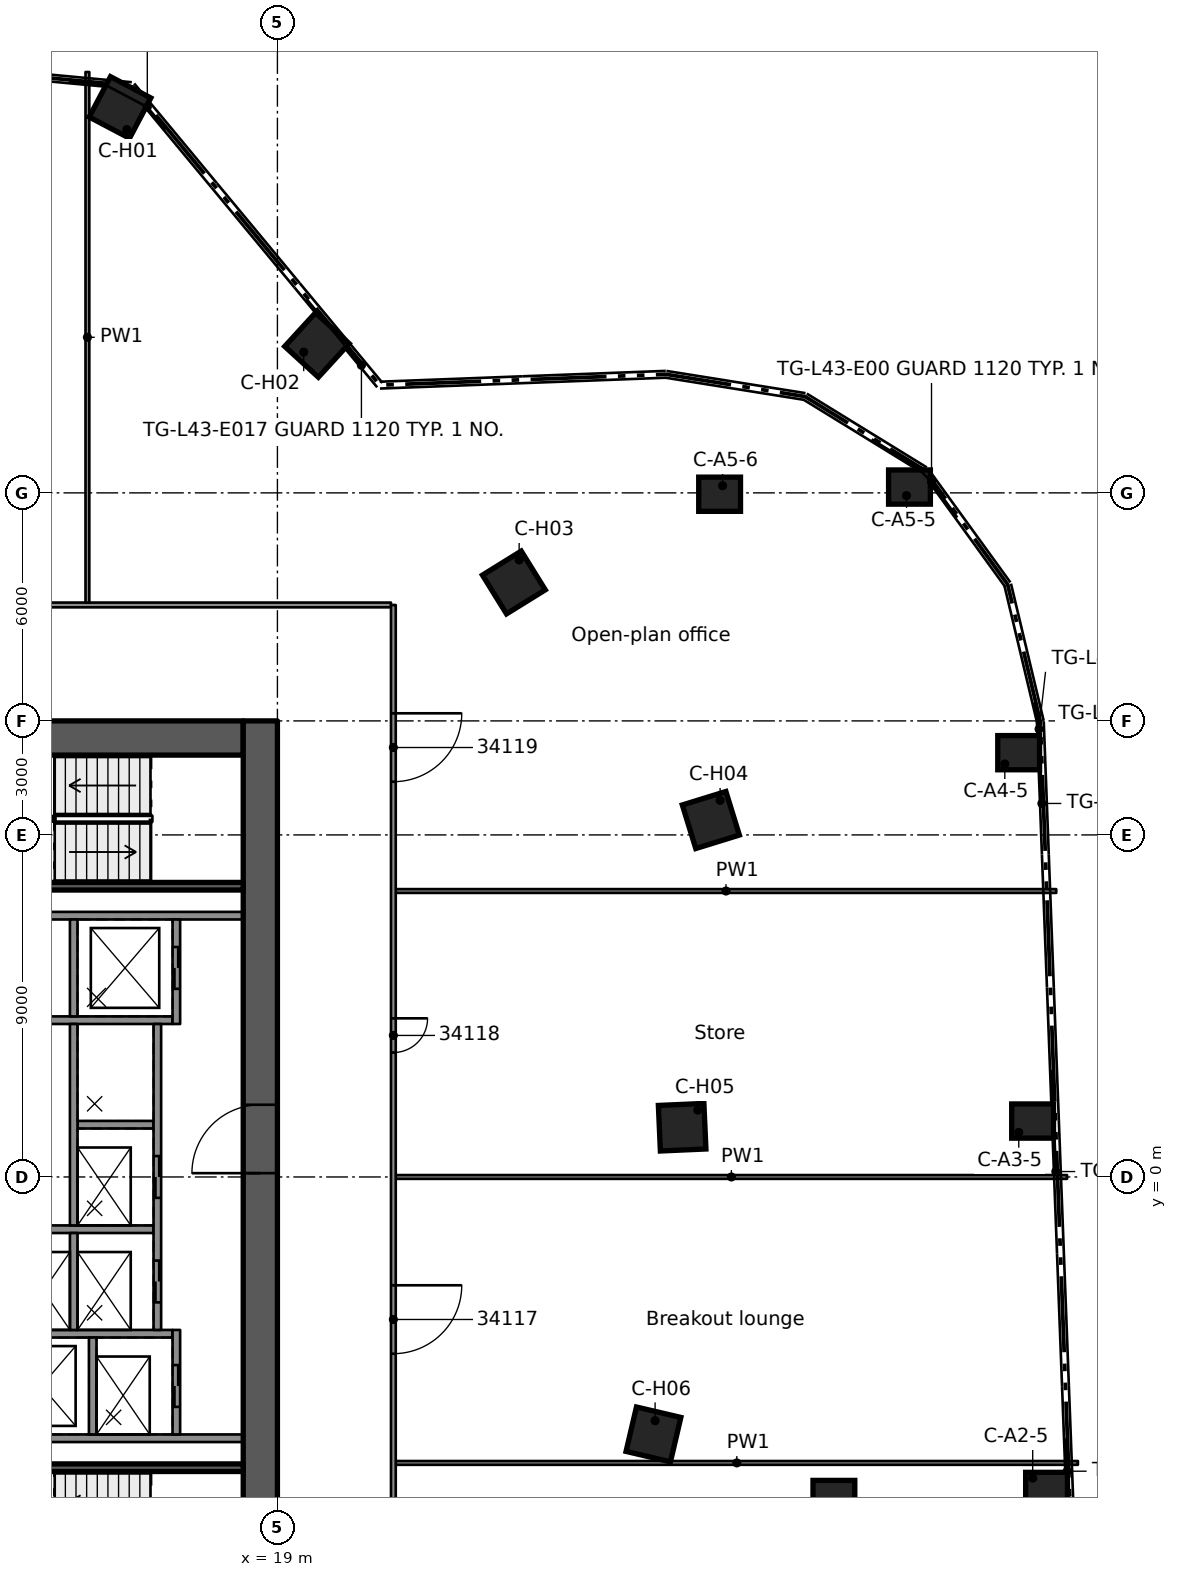
"""IFC4 building model, lengths in metres.
Left out: names, types, materials, properties, quantities, classifications, styles, units other than length and angle.
Written with IfcOpenShell. Run it as: python <this file> out.ifc"""

import sys

from ifc_helpers import new_model, si_unit, direction, frame, frame_2d, origin, origin_2d, place, context, subcontext, project, spatial, rectangle, extrude, element, fill, save


model = new_model("IFC4")
c1 = context("Model", 3, precision=1e-05, world=origin(), true_north=direction((0.0, 1.0)))
c2 = subcontext(c1, "Body", "Model", "MODEL_VIEW")
j1 = project(units=[si_unit("LENGTHUNIT", "METRE"), si_unit("PLANEANGLEUNIT", "RADIAN")], contexts=[c1])
p1 = place(None, origin())
s1 = spatial("IfcSite", under=j1, at=p1, CompositionType="ELEMENT")
p2 = place(p1, origin())
s2 = spatial("IfcBuilding", under=s1, at=p2, CompositionType="ELEMENT")
p3 = place(p2, frame((0.0, 0.0, 167.1)))
s3 = spatial("IfcBuildingStorey", under=s2, at=p3, CompositionType="ELEMENT", Elevation=167.1)
p4 = place(p3, frame((8.9, 11.55, 0.0), z_axis=(0.0, 0.0, 1.0), x_axis=(1.0, 0.0, 0.0)))
e1 = element("IfcWall", 1, at=p4, inside=s3, PredefinedType="SHEAR", context=c2, shape_type="SweptSolid", body=[
    extrude(rectangle(XDim=9.2, YDim=0.9, at=frame_2d((4.6, 0.0))), origin(), (0.0, 0.0, 1.0), 3.5),
])
p5 = place(p4, frame((3.0, 0.0, 0.0)))
e2 = element("IfcOpeningElement", 2, at=p5, cuts=e1, PredefinedType="OPENING", context=c2, shape_type="SweptSolid", body=[
    extrude(rectangle(XDim=1.1, YDim=2.1, at=frame_2d((0.55, 1.05))), frame((0.0, 0.46, 0.0), z_axis=(0.0, -1.0, 0.0), x_axis=(1.0, 0.0, 0.0)), (0.0, 0.0, 1.0), 0.92),
])
p6 = place(p4, frame((0.77, 0.0, 0.0)))
e3 = element("IfcOpeningElement", 3, at=p6, cuts=e1, PredefinedType="OPENING", context=c2, shape_type="SweptSolid", body=[
    extrude(rectangle(XDim=0.9, YDim=2.1, at=frame_2d((0.45, 1.05))), frame((0.0, 0.46, 0.0), z_axis=(0.0, -1.0, 0.0), x_axis=(1.0, 0.0, 0.0)), (0.0, 0.0, 1.0), 0.92),
])
p7 = place(p3, frame((18.55, -12.0, 0.0), z_axis=(0.0, 0.0, 1.0), x_axis=(0.0, 1.0, 0.0)))
e4 = element("IfcWall", 4, at=p7, inside=s3, PredefinedType="SHEAR", context=c2, shape_type="SweptSolid", body=[
    extrude(rectangle(XDim=24.0, YDim=0.9, at=frame_2d((12.0, 0.0))), origin(), (0.0, 0.0, 1.0), 3.5),
])
p8 = place(p7, frame((12.1, 0.0, 0.0)))
e5 = element("IfcOpeningElement", 5, at=p8, cuts=e4, PredefinedType="OPENING", context=c2, shape_type="SweptSolid", body=[
    extrude(rectangle(XDim=1.8, YDim=2.1, at=frame_2d((0.9, 1.05))), frame((0.0, 0.46, 0.0), z_axis=(0.0, -1.0, 0.0), x_axis=(1.0, 0.0, 0.0)), (0.0, 0.0, 1.0), 0.92),
])
for number, where, z_axis, x_axis in (
    (6, (39.239, -8.222, 0.0), (0.0, 0.0, 1.0), (1.0, 0.0, 0.0)),
    (7, (33.643, -8.434, 0.0), (0.0, 0.0, 1.0), (1.0, 0.0, 0.0)),
    (8, (38.872, 1.471, 0.0), (0.0, 0.0, 1.0), (1.0, 0.0, 0.0)),
    (9, (38.505, 11.164, 0.0), (0.0, 0.0, 1.0), (1.0, 0.0, 0.0)),
    (10, (35.632, 18.153, 0.0), (0.0, 0.0, 1.0), (1.0, 0.0, 0.0)),
    (11, (30.636, 17.964, 0.0), (0.0, 0.0, 1.0), (1.0, 0.0, 0.0)),
):
    element("IfcColumn", number, at=place(p3, frame(where, z_axis=z_axis, x_axis=x_axis)), inside=s3, PredefinedType="COLUMN", context=c2, shape_type="SweptSolid", body=[
        extrude(rectangle(XDim=1.1, YDim=0.9, at=origin_2d()), origin(), (0.0, 0.0, 1.0), 3.5),
    ])
for number, where, z_axis, x_axis in (
    (12, (14.858, 28.141, 0.0), (0.0, 0.0, 1.0), (0.467, 0.884, 0.0)),
    (13, (20.04, 21.891, 0.0), (0.0, 0.0, 1.0), (0.675, 0.738, 0.0)),
    (14, (25.222, 15.642, 0.0), (0.0, 0.0, 1.0), (0.85, 0.527, 0.0)),
    (15, (30.405, 9.392, 0.0), (0.0, 0.0, 1.0), (0.955, 0.295, 0.0)),
    (16, (29.65, 1.309, 0.0), (0.0, 0.0, 1.0), (0.999, 0.044, 0.0)),
    (17, (28.895, -6.774, 0.0), (0.0, 0.0, 1.0), (0.974, -0.228, 0.0)),
):
    element("IfcColumn", number, at=place(p3, frame(where, z_axis=z_axis, x_axis=x_axis)), inside=s3, PredefinedType="COLUMN", context=c2, shape_type="SweptSolid", body=[
        extrude(rectangle(XDim=1.2, YDim=1.2, at=origin_2d()), origin(), (0.0, 0.0, 1.0), 3.5),
    ])
for number, where, z_axis, x_axis in (
    (18, (11.54, -6.875, 0.0), (0.0, 0.0, 1.0), (1.0, 0.0, 0.0)),
    (19, (11.54, 6.875, 0.0), (0.0, 0.0, 1.0), (1.0, 0.0, 0.0)),
):
    element("IfcWall", number, at=place(p3, frame(where, z_axis=z_axis, x_axis=x_axis)), inside=s3, PredefinedType="SOLIDWALL", context=c2, shape_type="SweptSolid", body=[
        extrude(rectangle(XDim=6.56, YDim=0.2, at=frame_2d((3.28, 0.0))), origin(), (0.0, 0.0, 1.0), 3.08),
    ])
p9 = place(p3, frame((11.54, 4.125, 0.0), z_axis=(0.0, 0.0, 1.0), x_axis=(1.0, 0.0, 0.0)))
e20 = element("IfcWall", 20, at=p9, inside=s3, PredefinedType="SOLIDWALL", context=c2, shape_type="SweptSolid", body=[
    extrude(rectangle(XDim=4.7, YDim=0.2, at=frame_2d((2.35, 0.0))), origin(), (0.0, 0.0, 1.0), 3.08),
])
p10 = place(p3, frame((13.74, 1.375, 0.0), z_axis=(0.0, 0.0, 1.0), x_axis=(1.0, 0.0, 0.0)))
e21 = element("IfcWall", 21, at=p10, inside=s3, PredefinedType="SOLIDWALL", context=c2, shape_type="SweptSolid", body=[
    extrude(rectangle(XDim=2.0, YDim=0.2, at=frame_2d((1.0, 0.0))), origin(), (0.0, 0.0, 1.0), 3.08),
])
p11 = place(p3, frame((11.54, -1.375, 0.0), z_axis=(0.0, 0.0, 1.0), x_axis=(1.0, 0.0, 0.0)))
e22 = element("IfcWall", 22, at=p11, inside=s3, PredefinedType="SOLIDWALL", context=c2, shape_type="SweptSolid", body=[
    extrude(rectangle(XDim=4.2, YDim=0.2, at=frame_2d((2.1, 0.0))), origin(), (0.0, 0.0, 1.0), 3.08),
])
p12 = place(p3, frame((11.54, -4.125, 0.0), z_axis=(0.0, 0.0, 1.0), x_axis=(1.0, 0.0, 0.0)))
e23 = element("IfcWall", 23, at=p12, inside=s3, PredefinedType="SOLIDWALL", context=c2, shape_type="SweptSolid", body=[
    extrude(rectangle(XDim=4.7, YDim=0.2, at=frame_2d((2.35, 0.0))), origin(), (0.0, 0.0, 1.0), 3.08),
])
p13 = place(p3, frame((13.64, 6.775, 0.0), z_axis=(0.0, 0.0, 1.0), x_axis=(0.0, -1.0, 0.0)))
e24 = element("IfcWall", 24, at=p13, inside=s3, PredefinedType="SOLIDWALL", context=c2, shape_type="SweptSolid", body=[
    extrude(rectangle(XDim=2.55, YDim=0.2, at=frame_2d((1.275, 0.0))), origin(), (0.0, 0.0, 1.0), 3.08),
])
p14 = place(p3, frame((13.64, 4.025, 0.0), z_axis=(0.0, 0.0, 1.0), x_axis=(0.0, -1.0, 0.0)))
e25 = element("IfcWall", 25, at=p14, inside=s3, PredefinedType="SOLIDWALL", context=c2, shape_type="SweptSolid", body=[
    extrude(rectangle(XDim=5.3, YDim=0.2, at=frame_2d((2.65, 0.0))), origin(), (0.0, 0.0, 1.0), 3.08),
])
for number, where, z_axis, x_axis in (
    (26, (13.64, -1.475, 0.0), (0.0, 0.0, 1.0), (0.0, -1.0, 0.0)),
    (27, (14.14, -4.225, 0.0), (0.0, 0.0, 1.0), (0.0, -1.0, 0.0)),
):
    element("IfcWall", number, at=place(p3, frame(where, z_axis=z_axis, x_axis=x_axis)), inside=s3, PredefinedType="SOLIDWALL", context=c2, shape_type="SweptSolid", body=[
        extrude(rectangle(XDim=2.55, YDim=0.2, at=frame_2d((1.275, 0.0))), origin(), (0.0, 0.0, 1.0), 3.08),
    ])
p15 = place(p3, frame((16.34, 6.775, 0.0), z_axis=(0.0, 0.0, 1.0), x_axis=(0.0, -1.0, 0.0)))
e28 = element("IfcWall", 28, at=p15, inside=s3, PredefinedType="SOLIDWALL", context=c2, shape_type="SweptSolid", body=[
    extrude(rectangle(XDim=2.75, YDim=0.2, at=frame_2d((1.375, 0.0))), origin(), (0.0, 0.0, 1.0), 3.08),
])
p16 = place(p15, frame((0.725, 0.0, 0.0)))
e29 = element("IfcOpeningElement", 29, at=p16, cuts=e28, PredefinedType="OPENING", context=c2, shape_type="SweptSolid", body=[
    extrude(rectangle(XDim=1.1, YDim=2.1, at=frame_2d((0.55, 1.05))), frame((0.0, 0.11, 0.0), z_axis=(0.0, -1.0, 0.0), x_axis=(1.0, 0.0, 0.0)), (0.0, 0.0, 1.0), 0.22),
])
p17 = place(p3, frame((15.84, 4.025, 0.0), z_axis=(0.0, 0.0, 1.0), x_axis=(0.0, -1.0, 0.0)))
e30 = element("IfcWall", 30, at=p17, inside=s3, PredefinedType="SOLIDWALL", context=c2, shape_type="SweptSolid", body=[
    extrude(rectangle(XDim=8.05, YDim=0.2, at=frame_2d((4.025, 0.0))), origin(), (0.0, 0.0, 1.0), 3.08),
])
p18 = place(p17, frame((3.475, 0.0, 0.0)))
e31 = element("IfcOpeningElement", 31, at=p18, cuts=e30, PredefinedType="OPENING", context=c2, shape_type="SweptSolid", body=[
    extrude(rectangle(XDim=1.1, YDim=2.1, at=frame_2d((0.55, 1.05))), frame((0.0, 0.11, 0.0), z_axis=(0.0, -1.0, 0.0), x_axis=(1.0, 0.0, 0.0)), (0.0, 0.0, 1.0), 0.22),
])
p19 = place(p17, frame((6.225, 0.0, 0.0)))
e32 = element("IfcOpeningElement", 32, at=p19, cuts=e30, PredefinedType="OPENING", context=c2, shape_type="SweptSolid", body=[
    extrude(rectangle(XDim=1.1, YDim=2.1, at=frame_2d((0.55, 1.05))), frame((0.0, 0.11, 0.0), z_axis=(0.0, -1.0, 0.0), x_axis=(1.0, 0.0, 0.0)), (0.0, 0.0, 1.0), 0.22),
])
p20 = place(p3, frame((16.34, -4.025, 0.0), z_axis=(0.0, 0.0, 1.0), x_axis=(0.0, -1.0, 0.0)))
e33 = element("IfcWall", 33, at=p20, inside=s3, PredefinedType="SOLIDWALL", context=c2, shape_type="SweptSolid", body=[
    extrude(rectangle(XDim=2.75, YDim=0.2, at=frame_2d((1.375, 0.0))), origin(), (0.0, 0.0, 1.0), 3.08),
])
p21 = place(p20, frame((0.925, 0.0, 0.0)))
e34 = element("IfcOpeningElement", 34, at=p21, cuts=e33, PredefinedType="OPENING", context=c2, shape_type="SweptSolid", body=[
    extrude(rectangle(XDim=1.1, YDim=2.1, at=frame_2d((0.55, 1.05))), frame((0.0, 0.11, 0.0), z_axis=(0.0, -1.0, 0.0), x_axis=(1.0, 0.0, 0.0)), (0.0, 0.0, 1.0), 0.22),
])
for number, where, z_axis, x_axis in (
    (35, (11.54, -7.65, 0.0), (0.0, 0.0, 1.0), (1.0, 0.0, 0.0)),
    (36, (11.54, 7.65, 0.0), (0.0, 0.0, 1.0), (1.0, 0.0, 0.0)),
):
    element("IfcWall", number, at=place(p3, frame(where, z_axis=z_axis, x_axis=x_axis)), inside=s3, PredefinedType="SOLIDWALL", context=c2, shape_type="SweptSolid", body=[
        extrude(rectangle(XDim=6.56, YDim=0.2, at=frame_2d((3.28, 0.0))), origin(), (0.0, 0.0, 1.0), 3.08),
    ])
p22 = place(p3, frame((22.113, -7.524, 0.0), z_axis=(0.0, 0.0, 1.0), x_axis=(1.0, 0.0, 0.0)))
e37 = element("IfcWall", 37, at=p22, inside=s3, PredefinedType="PARTITIONING", context=c2, shape_type="SweptSolid", body=[
    extrude(rectangle(XDim=17.951, YDim=0.1, at=frame_2d((8.976, 0.0))), origin(), (0.0, 0.0, 1.0), 3.06),
])
p23 = place(p3, frame((22.113, 0.0, 0.0), z_axis=(0.0, 0.0, 1.0), x_axis=(1.0, 0.0, 0.0)))
e38 = element("IfcWall", 38, at=p23, inside=s3, PredefinedType="PARTITIONING", context=c2, shape_type="SweptSolid", body=[
    extrude(rectangle(XDim=17.666, YDim=0.1, at=frame_2d((8.833, 0.0))), origin(), (0.0, 0.0, 1.0), 3.06),
])
p24 = place(p3, frame((22.113, 7.524, 0.0), z_axis=(0.0, 0.0, 1.0), x_axis=(1.0, 0.0, 0.0)))
e39 = element("IfcWall", 39, at=p24, inside=s3, PredefinedType="PARTITIONING", context=c2, shape_type="SweptSolid", body=[
    extrude(rectangle(XDim=17.381, YDim=0.1, at=frame_2d((8.69, 0.0))), origin(), (0.0, 0.0, 1.0), 3.06),
])
p25 = place(p3, frame((10.991, 15.051, 0.0), z_axis=(0.0, 0.0, 1.0), x_axis=(1.0, 0.0, 0.0)))
e40 = element("IfcWall", 40, at=p25, inside=s3, PredefinedType="PARTITIONING", context=c2, shape_type="SweptSolid", body=[
    extrude(rectangle(XDim=10.997, YDim=0.125, at=frame_2d((5.499, 0.0))), origin(), (0.0, 0.0, 1.0), 3.06),
])
p26 = place(p3, frame((22.051, 15.05, 0.0), z_axis=(0.0, 0.0, 1.0), x_axis=(0.0, -1.0, 0.0)))
e41 = element("IfcWall", 41, at=p26, inside=s3, PredefinedType="PARTITIONING", context=c2, shape_type="SweptSolid", body=[
    extrude(rectangle(XDim=30.1, YDim=0.125, at=frame_2d((15.05, 0.0))), origin(), (0.0, 0.0, 1.0), 3.06),
])
p27 = place(p26, frame((25.924, 0.0, 0.0)))
e42 = element("IfcOpeningElement", 42, at=p27, cuts=e41, PredefinedType="OPENING", context=c2, shape_type="SweptSolid", body=[
    extrude(rectangle(XDim=0.9, YDim=2.1, at=frame_2d((0.45, 1.05))), frame((0.0, 0.073, 0.0), z_axis=(0.0, -1.0, 0.0), x_axis=(1.0, 0.0, 0.0)), (0.0, 0.0, 1.0), 0.145),
])
p28 = place(p26, frame((17.9, 0.0, 0.0)))
e43 = element("IfcOpeningElement", 43, at=p28, cuts=e41, PredefinedType="OPENING", context=c2, shape_type="SweptSolid", body=[
    extrude(rectangle(XDim=1.8, YDim=2.1, at=frame_2d((0.9, 1.05))), frame((0.0, 0.073, 0.0), z_axis=(0.0, -1.0, 0.0), x_axis=(1.0, 0.0, 0.0)), (0.0, 0.0, 1.0), 0.145),
])
p29 = place(p26, frame((10.876, 0.0, 0.0)))
e44 = element("IfcOpeningElement", 44, at=p29, cuts=e41, PredefinedType="OPENING", context=c2, shape_type="SweptSolid", body=[
    extrude(rectangle(XDim=0.9, YDim=2.1, at=frame_2d((0.45, 1.05))), frame((0.0, 0.073, 0.0), z_axis=(0.0, -1.0, 0.0), x_axis=(1.0, 0.0, 0.0)), (0.0, 0.0, 1.0), 0.145),
])
p30 = place(p26, frame((2.85, 0.0, 0.0)))
e45 = element("IfcOpeningElement", 45, at=p30, cuts=e41, PredefinedType="OPENING", context=c2, shape_type="SweptSolid", body=[
    extrude(rectangle(XDim=1.8, YDim=2.1, at=frame_2d((0.9, 1.05))), frame((0.0, 0.073, 0.0), z_axis=(0.0, -1.0, 0.0), x_axis=(1.0, 0.0, 0.0)), (0.0, 0.0, 1.0), 0.145),
])
p31 = place(p3, frame((14.0, 15.114, 0.0), z_axis=(0.0, 0.0, 1.0), x_axis=(0.0, 1.0, 0.0)))
e46 = element("IfcWall", 46, at=p31, inside=s3, PredefinedType="PARTITIONING", context=c2, shape_type="SweptSolid", body=[
    extrude(rectangle(XDim=13.96, YDim=0.1, at=frame_2d((6.98, 0.0))), origin(), (0.0, 0.0, 1.0), 3.06),
])
p32 = place(p16, origin())
e47 = element("IfcDoor", 47, at=p32, inside=s3, OperationType="DOUBLE_DOOR_SLIDING", PredefinedType="DOOR", context=c2, shape_type="SweptSolid", body=[
    extrude(rectangle(XDim=1.1, YDim=2.1, at=frame_2d((0.55, 1.05))), frame((0.0, 0.025, 0.0), z_axis=(0.0, -1.0, 0.0), x_axis=(1.0, 0.0, 0.0)), (0.0, 0.0, 1.0), 0.05),
])
fill(e29, e47)
p33 = place(p18, origin())
e48 = element("IfcDoor", 48, at=p33, inside=s3, OperationType="DOUBLE_DOOR_SLIDING", PredefinedType="DOOR", context=c2, shape_type="SweptSolid", body=[
    extrude(rectangle(XDim=1.1, YDim=2.1, at=frame_2d((0.55, 1.05))), frame((0.0, 0.025, 0.0), z_axis=(0.0, -1.0, 0.0), x_axis=(1.0, 0.0, 0.0)), (0.0, 0.0, 1.0), 0.05),
])
fill(e31, e48)
p34 = place(p19, origin())
e49 = element("IfcDoor", 49, at=p34, inside=s3, OperationType="DOUBLE_DOOR_SLIDING", PredefinedType="DOOR", context=c2, shape_type="SweptSolid", body=[
    extrude(rectangle(XDim=1.1, YDim=2.1, at=frame_2d((0.55, 1.05))), frame((0.0, 0.025, 0.0), z_axis=(0.0, -1.0, 0.0), x_axis=(1.0, 0.0, 0.0)), (0.0, 0.0, 1.0), 0.05),
])
fill(e32, e49)
p35 = place(p21, origin())
e50 = element("IfcDoor", 50, at=p35, inside=s3, OperationType="DOUBLE_DOOR_SLIDING", PredefinedType="DOOR", context=c2, shape_type="SweptSolid", body=[
    extrude(rectangle(XDim=1.1, YDim=2.1, at=frame_2d((0.55, 1.05))), frame((0.0, 0.025, 0.0), z_axis=(0.0, -1.0, 0.0), x_axis=(1.0, 0.0, 0.0)), (0.0, 0.0, 1.0), 0.05),
])
fill(e34, e50)
p36 = place(p8, origin())
e51 = element("IfcDoor", 51, at=p36, inside=s3, OperationType="SINGLE_SWING_RIGHT", PredefinedType="DOOR", context=c2, shape_type="SweptSolid", body=[
    extrude(rectangle(XDim=1.8, YDim=2.1, at=frame_2d((0.9, 1.05))), frame((0.0, 0.025, 0.0), z_axis=(0.0, -1.0, 0.0), x_axis=(1.0, 0.0, 0.0)), (0.0, 0.0, 1.0), 0.05),
])
fill(e5, e51)
p37 = place(p28, origin())
e52 = element("IfcDoor", 52, at=p37, inside=s3, OperationType="DOUBLE_DOOR_SINGLE_SWING", PredefinedType="DOOR", context=c2, shape_type="SweptSolid", body=[
    extrude(rectangle(XDim=1.8, YDim=2.1, at=frame_2d((0.9, 1.05))), frame((0.0, 0.025, 0.0), z_axis=(0.0, -1.0, 0.0), x_axis=(1.0, 0.0, 0.0)), (0.0, 0.0, 1.0), 0.05),
])
fill(e43, e52)
p38 = place(p29, origin())
e53 = element("IfcDoor", 53, at=p38, inside=s3, OperationType="SINGLE_SWING_LEFT", PredefinedType="DOOR", context=c2, shape_type="SweptSolid", body=[
    extrude(rectangle(XDim=0.9, YDim=2.1, at=frame_2d((0.45, 1.05))), frame((0.0, 0.025, 0.0), z_axis=(0.0, -1.0, 0.0), x_axis=(1.0, 0.0, 0.0)), (0.0, 0.0, 1.0), 0.05),
])
fill(e44, e53)
p39 = place(p30, origin())
e54 = element("IfcDoor", 54, at=p39, inside=s3, OperationType="DOUBLE_DOOR_SINGLE_SWING", PredefinedType="DOOR", context=c2, shape_type="SweptSolid", body=[
    extrude(rectangle(XDim=1.8, YDim=2.1, at=frame_2d((0.9, 1.05))), frame((0.0, 0.025, 0.0), z_axis=(0.0, -1.0, 0.0), x_axis=(1.0, 0.0, 0.0)), (0.0, 0.0, 1.0), 0.05),
])
fill(e45, e54)
save(model, sys.argv[1])
